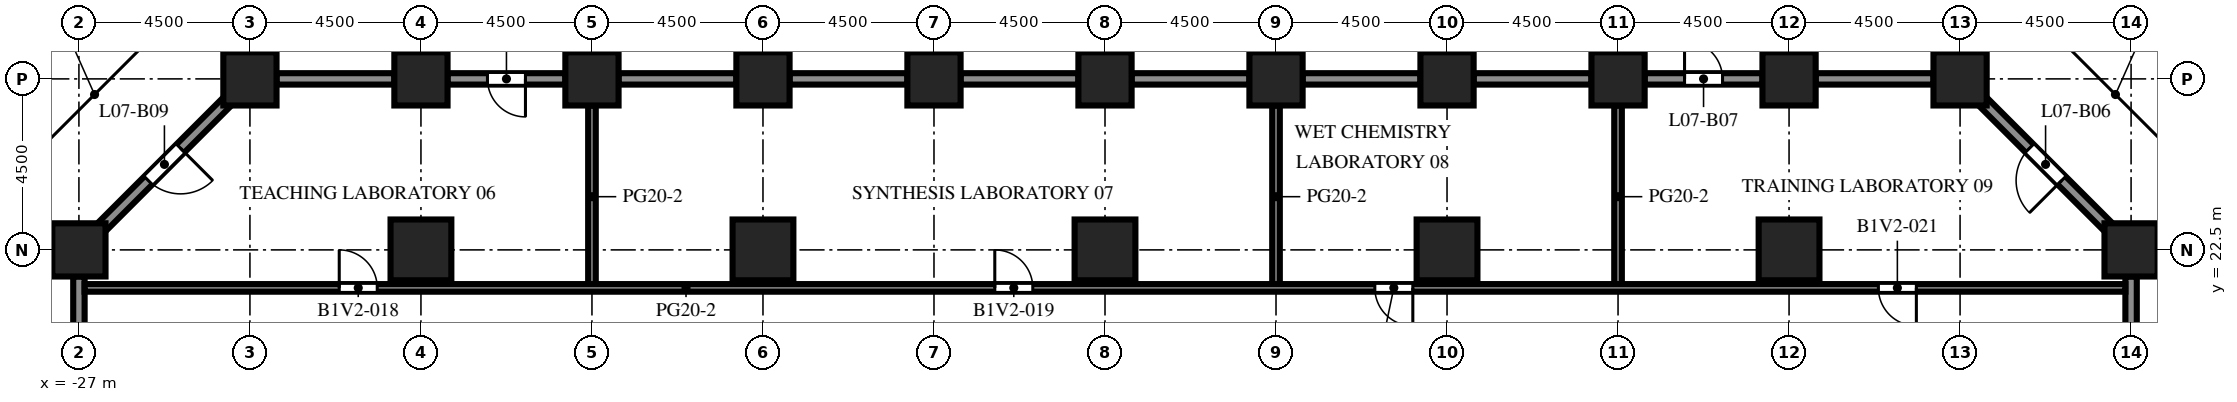
"""IFC4 building model, lengths in metres.
Left out: names, types, materials, properties, quantities, classifications, styles, units other than length and angle.
Written with IfcOpenShell. Run it as: python <this file> out.ifc"""

import sys

from ifc_helpers import new_model, si_unit, direction, frame, frame_2d, origin, origin_2d, place, context, subcontext, project, spatial, rectangle, extrude, element, fill, save


model = new_model("IFC4")
c1 = context("Model", 3, precision=1e-05, world=origin(), true_north=direction((0.0, 1.0)))
c2 = subcontext(c1, "Body", "Model", "MODEL_VIEW")
j1 = project(units=[si_unit("LENGTHUNIT", "METRE"), si_unit("PLANEANGLEUNIT", "RADIAN")], contexts=[c1])
p1 = place(None, origin())
s1 = spatial("IfcSite", under=j1, at=p1, CompositionType="ELEMENT")
p2 = place(p1, origin())
s2 = spatial("IfcBuilding", under=s1, at=p2, CompositionType="ELEMENT")
p3 = place(p2, frame((0.0, 0.0, 31.8)))
s3 = spatial("IfcBuildingStorey", under=s2, at=p3, CompositionType="ELEMENT", Elevation=31.8)
for number, where, z_axis, x_axis in (
    (1, (-27.0, 22.5, 0.0), (0.0, 0.0, 1.0), (1.0, 0.0, 0.0)),
    (2, (-22.5, 27.0, 0.0), (0.0, 0.0, 1.0), (1.0, 0.0, 0.0)),
    (3, (-18.0, 27.0, 0.0), (0.0, 0.0, 1.0), (1.0, 0.0, 0.0)),
    (4, (-13.5, 27.0, 0.0), (0.0, 0.0, 1.0), (1.0, 0.0, 0.0)),
    (5, (-9.0, 27.0, 0.0), (0.0, 0.0, 1.0), (1.0, 0.0, 0.0)),
    (6, (-4.5, 27.0, 0.0), (0.0, 0.0, 1.0), (1.0, 0.0, 0.0)),
    (7, (0.0, 27.0, 0.0), (0.0, 0.0, 1.0), (1.0, 0.0, 0.0)),
    (8, (4.5, 27.0, 0.0), (0.0, 0.0, 1.0), (1.0, 0.0, 0.0)),
    (9, (9.0, 27.0, 0.0), (0.0, 0.0, 1.0), (1.0, 0.0, 0.0)),
    (10, (13.5, 27.0, 0.0), (0.0, 0.0, 1.0), (1.0, 0.0, 0.0)),
    (11, (18.0, 27.0, 0.0), (0.0, 0.0, 1.0), (1.0, 0.0, 0.0)),
    (12, (22.5, 27.0, 0.0), (0.0, 0.0, 1.0), (1.0, 0.0, 0.0)),
    (13, (27.0, 22.5, 0.0), (0.0, 0.0, 1.0), (1.0, 0.0, 0.0)),
):
    element("IfcColumn", number, at=place(p3, frame(where, z_axis=z_axis, x_axis=x_axis)), inside=s3, PredefinedType="COLUMN", context=c2, shape_type="SweptSolid", body=[
        extrude(rectangle(XDim=1.4, YDim=1.4, at=origin_2d()), origin(), (0.0, 0.0, 1.0), 4.1),
    ])
for number, where, z_axis, x_axis in (
    (14, (-18.0, 22.5, 0.0), (0.0, 0.0, 1.0), (1.0, 0.0, 0.0)),
    (15, (-9.0, 22.5, 0.0), (0.0, 0.0, 1.0), (1.0, 0.0, 0.0)),
    (16, (0.0, 22.5, 0.0), (0.0, 0.0, 1.0), (1.0, 0.0, 0.0)),
    (17, (9.0, 22.5, 0.0), (0.0, 0.0, 1.0), (1.0, 0.0, 0.0)),
    (18, (18.0, 22.5, 0.0), (0.0, 0.0, 1.0), (1.0, 0.0, 0.0)),
):
    element("IfcColumn", number, at=place(p3, frame(where, z_axis=z_axis, x_axis=x_axis)), inside=s3, PredefinedType="COLUMN", context=c2, shape_type="SweptSolid", body=[
        extrude(rectangle(XDim=1.6, YDim=1.6, at=origin_2d()), origin(), (0.0, 0.0, 1.0), 4.1),
    ])
p4 = place(p3, frame((27.0, 21.8, 0.0), z_axis=(0.0, 0.0, 1.0), x_axis=(0.0, -1.0, 0.0)))
e19 = element("IfcWall", 19, at=p4, inside=s3, PredefinedType="SOLIDWALL", context=c2, shape_type="SweptSolid", body=[
    extrude(rectangle(XDim=3.1, YDim=0.3, at=frame_2d((1.55, 0.0))), origin(), (0.0, 0.0, 1.0), 2.6),
])
p5 = place(p3, frame((23.094, 26.406, 0.0), z_axis=(0.0, 0.0, 1.0), x_axis=(0.707106781187, -0.707106781187, 0.0)))
e20 = element("IfcWall", 20, at=p5, inside=s3, PredefinedType="SOLIDWALL", context=c2, shape_type="SweptSolid", body=[
    extrude(rectangle(XDim=4.684, YDim=0.3, at=frame_2d((2.342, 0.0))), origin(), (0.0, 0.0, 1.0), 2.6),
])
p6 = place(p5, frame((1.742, 0.0, 0.0)))
e21 = element("IfcOpeningElement", 21, at=p6, cuts=e20, PredefinedType="OPENING", context=c2, shape_type="SweptSolid", body=[
    extrude(rectangle(XDim=1.2, YDim=2.2, at=frame_2d((0.6, 1.1))), frame((0.0, 0.16, 0.0), z_axis=(0.0, -1.0, 0.0), x_axis=(1.0, 0.0, 0.0)), (0.0, 0.0, 1.0), 0.32),
])
p7 = place(p3, frame((18.7, 27.0, 0.0), z_axis=(0.0, 0.0, 1.0), x_axis=(1.0, 0.0, 0.0)))
e22 = element("IfcWall", 22, at=p7, inside=s3, PredefinedType="SOLIDWALL", context=c2, shape_type="SweptSolid", body=[
    extrude(rectangle(XDim=3.1, YDim=0.3, at=frame_2d((1.55, 0.0))), origin(), (0.0, 0.0, 1.0), 2.6),
])
p8 = place(p3, frame((14.2, 27.0, 0.0), z_axis=(0.0, 0.0, 1.0), x_axis=(1.0, 0.0, 0.0)))
e23 = element("IfcWall", 23, at=p8, inside=s3, PredefinedType="SOLIDWALL", context=c2, shape_type="SweptSolid", body=[
    extrude(rectangle(XDim=3.1, YDim=0.3, at=frame_2d((1.55, 0.0))), origin(), (0.0, 0.0, 1.0), 2.6),
])
p9 = place(p8, frame((1.05, 0.0, 0.0)))
e24 = element("IfcOpeningElement", 24, at=p9, cuts=e23, PredefinedType="OPENING", context=c2, shape_type="SweptSolid", body=[
    extrude(rectangle(XDim=1.0, YDim=2.2, at=frame_2d((0.5, 1.1))), frame((0.0, 0.16, 0.0), z_axis=(0.0, -1.0, 0.0), x_axis=(1.0, 0.0, 0.0)), (0.0, 0.0, 1.0), 0.32),
])
for number, where, z_axis, x_axis in (
    (25, (9.7, 27.0, 0.0), (0.0, 0.0, 1.0), (1.0, 0.0, 0.0)),
    (26, (5.2, 27.0, 0.0), (0.0, 0.0, 1.0), (1.0, 0.0, 0.0)),
    (27, (0.7, 27.0, 0.0), (0.0, 0.0, 1.0), (1.0, 0.0, 0.0)),
    (28, (-3.8, 27.0, 0.0), (0.0, 0.0, 1.0), (1.0, 0.0, 0.0)),
    (29, (-8.3, 27.0, 0.0), (0.0, 0.0, 1.0), (1.0, 0.0, 0.0)),
    (30, (-12.8, 27.0, 0.0), (0.0, 0.0, 1.0), (1.0, 0.0, 0.0)),
):
    element("IfcWall", number, at=place(p3, frame(where, z_axis=z_axis, x_axis=x_axis)), inside=s3, PredefinedType="SOLIDWALL", context=c2, shape_type="SweptSolid", body=[
        extrude(rectangle(XDim=3.1, YDim=0.3, at=frame_2d((1.55, 0.0))), origin(), (0.0, 0.0, 1.0), 2.6),
    ])
p10 = place(p3, frame((-17.3, 27.0, 0.0), z_axis=(0.0, 0.0, 1.0), x_axis=(1.0, 0.0, 0.0)))
e31 = element("IfcWall", 31, at=p10, inside=s3, PredefinedType="SOLIDWALL", context=c2, shape_type="SweptSolid", body=[
    extrude(rectangle(XDim=3.1, YDim=0.3, at=frame_2d((1.55, 0.0))), origin(), (0.0, 0.0, 1.0), 2.6),
])
p11 = place(p10, frame((1.05, 0.0, 0.0)))
e32 = element("IfcOpeningElement", 32, at=p11, cuts=e31, PredefinedType="OPENING", context=c2, shape_type="SweptSolid", body=[
    extrude(rectangle(XDim=1.0, YDim=2.2, at=frame_2d((0.5, 1.1))), frame((0.0, 0.16, 0.0), z_axis=(0.0, -1.0, 0.0), x_axis=(1.0, 0.0, 0.0)), (0.0, 0.0, 1.0), 0.32),
])
p12 = place(p3, frame((-21.8, 27.0, 0.0), z_axis=(0.0, 0.0, 1.0), x_axis=(1.0, 0.0, 0.0)))
e33 = element("IfcWall", 33, at=p12, inside=s3, PredefinedType="SOLIDWALL", context=c2, shape_type="SweptSolid", body=[
    extrude(rectangle(XDim=3.1, YDim=0.3, at=frame_2d((1.55, 0.0))), origin(), (0.0, 0.0, 1.0), 2.6),
])
p13 = place(p3, frame((-26.406, 23.094, 0.0), z_axis=(0.0, 0.0, 1.0), x_axis=(0.707106781187, 0.707106781187, 0.0)))
e34 = element("IfcWall", 34, at=p13, inside=s3, PredefinedType="SOLIDWALL", context=c2, shape_type="SweptSolid", body=[
    extrude(rectangle(XDim=4.684, YDim=0.3, at=frame_2d((2.342, 0.0))), origin(), (0.0, 0.0, 1.0), 2.6),
])
p14 = place(p13, frame((1.742, 0.0, 0.0)))
e35 = element("IfcOpeningElement", 35, at=p14, cuts=e34, PredefinedType="OPENING", context=c2, shape_type="SweptSolid", body=[
    extrude(rectangle(XDim=1.2, YDim=2.2, at=frame_2d((0.6, 1.1))), frame((0.0, 0.16, 0.0), z_axis=(0.0, -1.0, 0.0), x_axis=(1.0, 0.0, 0.0)), (0.0, 0.0, 1.0), 0.32),
])
p15 = place(p3, frame((-27.0, 18.7, 0.0), z_axis=(0.0, 0.0, 1.0), x_axis=(0.0, 1.0, 0.0)))
e36 = element("IfcWall", 36, at=p15, inside=s3, PredefinedType="SOLIDWALL", context=c2, shape_type="SweptSolid", body=[
    extrude(rectangle(XDim=3.1, YDim=0.3, at=frame_2d((1.55, 0.0))), origin(), (0.0, 0.0, 1.0), 2.6),
])
for number, where, z_axis, x_axis in (
    (37, (-13.5, 21.5, 0.0), (0.0, 0.0, 1.0), (0.0, 1.0, 0.0)),
    (38, (4.5, 21.5, 0.0), (0.0, 0.0, 1.0), (0.0, 1.0, 0.0)),
    (39, (13.5, 21.5, 0.0), (0.0, 0.0, 1.0), (0.0, 1.0, 0.0)),
):
    element("IfcWall", number, at=place(p3, frame(where, z_axis=z_axis, x_axis=x_axis)), inside=s3, PredefinedType="PARTITIONING", context=c2, shape_type="SweptSolid", body=[
        extrude(rectangle(XDim=4.8, YDim=0.2, at=frame_2d((2.4, 0.0))), origin(), (0.0, 0.0, 1.0), 3.5),
    ])
p16 = place(p3, frame((-26.85, 21.5, 0.0), z_axis=(0.0, 0.0, 1.0), x_axis=(1.0, 0.0, 0.0)))
e40 = element("IfcWall", 40, at=p16, inside=s3, PredefinedType="PARTITIONING", context=c2, shape_type="SweptSolid", body=[
    extrude(rectangle(XDim=53.7, YDim=0.2, at=frame_2d((26.85, 0.0))), origin(), (0.0, 0.0, 1.0), 3.5),
])
p17 = place(p16, frame((6.7, 0.0, 0.0)))
e41 = element("IfcOpeningElement", 41, at=p17, cuts=e40, PredefinedType="OPENING", context=c2, shape_type="SweptSolid", body=[
    extrude(rectangle(XDim=1.0, YDim=2.1, at=frame_2d((0.5, 1.05))), frame((0.0, 0.11, 0.0), z_axis=(0.0, -1.0, 0.0), x_axis=(1.0, 0.0, 0.0)), (0.0, 0.0, 1.0), 0.22),
])
p18 = place(p16, frame((23.95, 0.0, 0.0)))
e42 = element("IfcOpeningElement", 42, at=p18, cuts=e40, PredefinedType="OPENING", context=c2, shape_type="SweptSolid", body=[
    extrude(rectangle(XDim=1.0, YDim=2.1, at=frame_2d((0.5, 1.05))), frame((0.0, 0.11, 0.0), z_axis=(0.0, -1.0, 0.0), x_axis=(1.0, 0.0, 0.0)), (0.0, 0.0, 1.0), 0.22),
])
p19 = place(p16, frame((33.95, 0.0, 0.0)))
e43 = element("IfcOpeningElement", 43, at=p19, cuts=e40, PredefinedType="OPENING", context=c2, shape_type="SweptSolid", body=[
    extrude(rectangle(XDim=1.0, YDim=2.1, at=frame_2d((0.5, 1.05))), frame((0.0, 0.11, 0.0), z_axis=(0.0, -1.0, 0.0), x_axis=(1.0, 0.0, 0.0)), (0.0, 0.0, 1.0), 0.22),
])
p20 = place(p16, frame((47.2, 0.0, 0.0)))
e44 = element("IfcOpeningElement", 44, at=p20, cuts=e40, PredefinedType="OPENING", context=c2, shape_type="SweptSolid", body=[
    extrude(rectangle(XDim=1.0, YDim=2.1, at=frame_2d((0.5, 1.05))), frame((0.0, 0.11, 0.0), z_axis=(0.0, -1.0, 0.0), x_axis=(1.0, 0.0, 0.0)), (0.0, 0.0, 1.0), 0.22),
])
p21 = place(p6, origin())
e45 = element("IfcDoor", 45, at=p21, inside=s3, OperationType="SINGLE_SWING_RIGHT", PredefinedType="DOOR", context=c2, shape_type="SweptSolid", body=[
    extrude(rectangle(XDim=1.2, YDim=2.2, at=frame_2d((0.6, 1.1))), frame((0.0, 0.025, 0.0), z_axis=(0.0, -1.0, 0.0), x_axis=(1.0, 0.0, 0.0)), (0.0, 0.0, 1.0), 0.05),
])
fill(e21, e45)
p22 = place(p9, origin())
e46 = element("IfcDoor", 46, at=p22, inside=s3, OperationType="SINGLE_SWING_LEFT", PredefinedType="DOOR", context=c2, shape_type="SweptSolid", body=[
    extrude(rectangle(XDim=1.0, YDim=2.2, at=frame_2d((0.5, 1.1))), frame((0.0, 0.025, 0.0), z_axis=(0.0, -1.0, 0.0), x_axis=(1.0, 0.0, 0.0)), (0.0, 0.0, 1.0), 0.05),
])
fill(e24, e46)
p23 = place(p11, origin())
e47 = element("IfcDoor", 47, at=p23, inside=s3, OperationType="SINGLE_SWING_RIGHT", PredefinedType="DOOR", context=c2, shape_type="SweptSolid", body=[
    extrude(rectangle(XDim=1.0, YDim=2.2, at=frame_2d((0.5, 1.1))), frame((0.0, 0.025, 0.0), z_axis=(0.0, -1.0, 0.0), x_axis=(1.0, 0.0, 0.0)), (0.0, 0.0, 1.0), 0.05),
])
fill(e32, e47)
p24 = place(p14, origin())
e48 = element("IfcDoor", 48, at=p24, inside=s3, OperationType="SINGLE_SWING_RIGHT", PredefinedType="DOOR", context=c2, shape_type="SweptSolid", body=[
    extrude(rectangle(XDim=1.2, YDim=2.2, at=frame_2d((0.6, 1.1))), frame((0.0, 0.025, 0.0), z_axis=(0.0, -1.0, 0.0), x_axis=(1.0, 0.0, 0.0)), (0.0, 0.0, 1.0), 0.05),
])
fill(e35, e48)
p25 = place(p17, origin())
e49 = element("IfcDoor", 49, at=p25, inside=s3, OperationType="SINGLE_SWING_LEFT", PredefinedType="DOOR", context=c2, shape_type="SweptSolid", body=[
    extrude(rectangle(XDim=1.0, YDim=2.1, at=frame_2d((0.5, 1.05))), frame((0.0, 0.025, 0.0), z_axis=(0.0, -1.0, 0.0), x_axis=(1.0, 0.0, 0.0)), (0.0, 0.0, 1.0), 0.05),
])
fill(e41, e49)
p26 = place(p18, origin())
e50 = element("IfcDoor", 50, at=p26, inside=s3, OperationType="SINGLE_SWING_LEFT", PredefinedType="DOOR", context=c2, shape_type="SweptSolid", body=[
    extrude(rectangle(XDim=1.0, YDim=2.1, at=frame_2d((0.5, 1.05))), frame((0.0, 0.025, 0.0), z_axis=(0.0, -1.0, 0.0), x_axis=(1.0, 0.0, 0.0)), (0.0, 0.0, 1.0), 0.05),
])
fill(e42, e50)
p27 = place(p19, origin())
e51 = element("IfcDoor", 51, at=p27, inside=s3, OperationType="SINGLE_SWING_RIGHT", PredefinedType="DOOR", context=c2, shape_type="SweptSolid", body=[
    extrude(rectangle(XDim=1.0, YDim=2.1, at=frame_2d((0.5, 1.05))), frame((0.0, 0.025, 0.0), z_axis=(0.0, -1.0, 0.0), x_axis=(1.0, 0.0, 0.0)), (0.0, 0.0, 1.0), 0.05),
])
fill(e43, e51)
p28 = place(p20, origin())
e52 = element("IfcDoor", 52, at=p28, inside=s3, OperationType="SINGLE_SWING_RIGHT", PredefinedType="DOOR", context=c2, shape_type="SweptSolid", body=[
    extrude(rectangle(XDim=1.0, YDim=2.1, at=frame_2d((0.5, 1.05))), frame((0.0, 0.025, 0.0), z_axis=(0.0, -1.0, 0.0), x_axis=(1.0, 0.0, 0.0)), (0.0, 0.0, 1.0), 0.05),
])
fill(e44, e52)
save(model, sys.argv[1])
